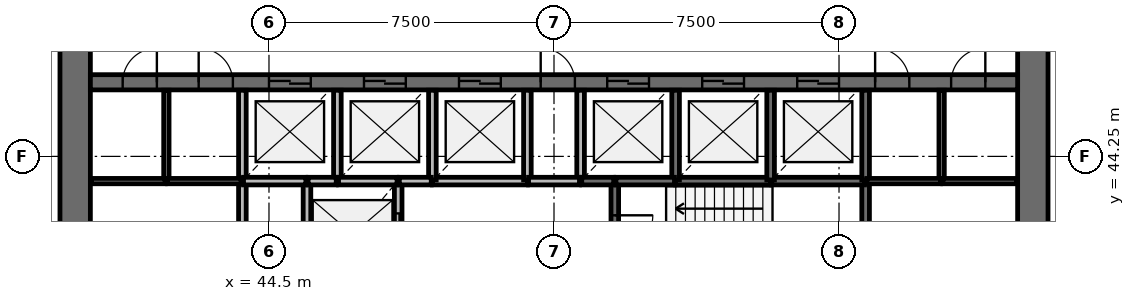
"""IFC4 building model, lengths in metres.
Left out: names, types, materials, properties, quantities, classifications, styles, units other than length and angle.
Written with IfcOpenShell. Run it as: python <this file> out.ifc"""

import sys

from ifc_helpers import new_model, si_unit, direction, frame, frame_2d, origin, place, context, subcontext, project, spatial, rectangle, extrude, source, transform, mapped, element, fill, save


model = new_model("IFC4")
c1 = context("Model", 3, precision=1e-05, world=origin(), true_north=direction((0.0, 1.0)))
c2 = subcontext(c1, "Body", "Model", "MODEL_VIEW")
j1 = project(units=[si_unit("LENGTHUNIT", "METRE"), si_unit("PLANEANGLEUNIT", "RADIAN")], contexts=[c1])
p1 = place(None, origin())
s1 = spatial("IfcSite", under=j1, at=p1, CompositionType="ELEMENT")
p2 = place(p1, origin())
s2 = spatial("IfcBuilding", under=s1, at=p2, CompositionType="ELEMENT")
p3 = place(p2, frame((0.0, 0.0, 133.1)))
s3 = spatial("IfcBuildingStorey", under=s2, at=p3, CompositionType="ELEMENT", Elevation=133.1)
p4 = place(p3, frame((64.6, 38.0, 0.0), z_axis=(0.0, 0.0, 1.0), x_axis=(0.0, 1.0, 0.0)))
e1 = element("IfcWall", 1, at=p4, inside=s3, PredefinedType="SHEAR", context=c2, shape_type="SweptSolid", body=[
    extrude(rectangle(XDim=20.0, YDim=0.8, at=frame_2d((10.0, 0.0))), origin(), (0.0, 0.0, 1.0), 3.9),
])
p5 = place(p4, frame((9.1, 0.0, 0.0)))
e2 = element("IfcOpeningElement", 2, at=p5, cuts=e1, PredefinedType="OPENING", context=c2, shape_type="SweptSolid", body=[
    extrude(rectangle(XDim=1.8, YDim=2.1, at=frame_2d((0.9, 1.05))), frame((0.0, 0.41, 0.0), z_axis=(0.0, -1.0, 0.0), x_axis=(1.0, 0.0, 0.0)), (0.0, 0.0, 1.0), 0.82),
])
p6 = place(p3, frame((39.4, 58.0, 0.0), z_axis=(0.0, 0.0, 1.0), x_axis=(0.0, -1.0, 0.0)))
e3 = element("IfcWall", 3, at=p6, inside=s3, PredefinedType="SHEAR", context=c2, shape_type="SweptSolid", body=[
    extrude(rectangle(XDim=20.0, YDim=0.8, at=frame_2d((10.0, 0.0))), origin(), (0.0, 0.0, 1.0), 3.9),
])
p7 = place(p6, frame((9.1, 0.0, 0.0)))
e4 = element("IfcOpeningElement", 4, at=p7, cuts=e3, PredefinedType="OPENING", context=c2, shape_type="SweptSolid", body=[
    extrude(rectangle(XDim=1.8, YDim=2.1, at=frame_2d((0.9, 1.05))), frame((0.0, 0.41, 0.0), z_axis=(0.0, -1.0, 0.0), x_axis=(1.0, 0.0, 0.0)), (0.0, 0.0, 1.0), 0.82),
])
p8 = place(p3, frame((39.8, 46.2, 0.0), z_axis=(0.0, 0.0, 1.0), x_axis=(1.0, 0.0, 0.0)))
e5 = element("IfcWall", 5, at=p8, inside=s3, PredefinedType="SHEAR", context=c2, shape_type="SweptSolid", body=[
    extrude(rectangle(XDim=24.4, YDim=0.4, at=frame_2d((12.2, 0.0))), origin(), (0.0, 0.0, 1.0), 3.9),
])
p9 = place(p8, frame((13.6, 0.0, 0.0)))
e6 = element("IfcOpeningElement", 6, at=p9, cuts=e5, PredefinedType="OPENING", context=c2, shape_type="SweptSolid", body=[
    extrude(rectangle(XDim=1.1, YDim=2.1, at=frame_2d((0.55, 1.05))), frame((0.0, 0.21, 0.0), z_axis=(0.0, -1.0, 0.0), x_axis=(1.0, 0.0, 0.0)), (0.0, 0.0, 1.0), 0.42),
])
p10 = place(p8, frame((16.1, 0.0, 0.0)))
e7 = element("IfcOpeningElement", 7, at=p10, cuts=e5, PredefinedType="OPENING", context=c2, shape_type="SweptSolid", body=[
    extrude(rectangle(XDim=1.1, YDim=2.1, at=frame_2d((0.55, 1.05))), frame((0.0, 0.21, 0.0), z_axis=(0.0, -1.0, 0.0), x_axis=(1.0, 0.0, 0.0)), (0.0, 0.0, 1.0), 0.42),
])
p11 = place(p8, frame((18.6, 0.0, 0.0)))
e8 = element("IfcOpeningElement", 8, at=p11, cuts=e5, PredefinedType="OPENING", context=c2, shape_type="SweptSolid", body=[
    extrude(rectangle(XDim=1.1, YDim=2.1, at=frame_2d((0.55, 1.05))), frame((0.0, 0.21, 0.0), z_axis=(0.0, -1.0, 0.0), x_axis=(1.0, 0.0, 0.0)), (0.0, 0.0, 1.0), 0.42),
])
p12 = place(p8, frame((4.7, 0.0, 0.0)))
e9 = element("IfcOpeningElement", 9, at=p12, cuts=e5, PredefinedType="OPENING", context=c2, shape_type="SweptSolid", body=[
    extrude(rectangle(XDim=1.1, YDim=2.1, at=frame_2d((0.55, 1.05))), frame((0.0, 0.21, 0.0), z_axis=(0.0, -1.0, 0.0), x_axis=(1.0, 0.0, 0.0)), (0.0, 0.0, 1.0), 0.42),
])
p13 = place(p8, frame((7.2, 0.0, 0.0)))
e10 = element("IfcOpeningElement", 10, at=p13, cuts=e5, PredefinedType="OPENING", context=c2, shape_type="SweptSolid", body=[
    extrude(rectangle(XDim=1.1, YDim=2.1, at=frame_2d((0.55, 1.05))), frame((0.0, 0.21, 0.0), z_axis=(0.0, -1.0, 0.0), x_axis=(1.0, 0.0, 0.0)), (0.0, 0.0, 1.0), 0.42),
])
p14 = place(p8, frame((9.7, 0.0, 0.0)))
e11 = element("IfcOpeningElement", 11, at=p14, cuts=e5, PredefinedType="OPENING", context=c2, shape_type="SweptSolid", body=[
    extrude(rectangle(XDim=1.1, YDim=2.1, at=frame_2d((0.55, 1.05))), frame((0.0, 0.21, 0.0), z_axis=(0.0, -1.0, 0.0), x_axis=(1.0, 0.0, 0.0)), (0.0, 0.0, 1.0), 0.42),
])
p15 = place(p8, frame((20.65, 0.0, 0.0)))
e12 = element("IfcOpeningElement", 12, at=p15, cuts=e5, PredefinedType="OPENING", context=c2, shape_type="SweptSolid", body=[
    extrude(rectangle(XDim=0.9, YDim=2.1, at=frame_2d((0.45, 1.05))), frame((0.0, 0.21, 0.0), z_axis=(0.0, -1.0, 0.0), x_axis=(1.0, 0.0, 0.0)), (0.0, 0.0, 1.0), 0.42),
])
p16 = place(p8, frame((22.65, 0.0, 0.0)))
e13 = element("IfcOpeningElement", 13, at=p16, cuts=e5, PredefinedType="OPENING", context=c2, shape_type="SweptSolid", body=[
    extrude(rectangle(XDim=0.9, YDim=2.1, at=frame_2d((0.45, 1.05))), frame((0.0, 0.21, 0.0), z_axis=(0.0, -1.0, 0.0), x_axis=(1.0, 0.0, 0.0)), (0.0, 0.0, 1.0), 0.42),
])
p17 = place(p8, frame((0.85, 0.0, 0.0)))
e14 = element("IfcOpeningElement", 14, at=p17, cuts=e5, PredefinedType="OPENING", context=c2, shape_type="SweptSolid", body=[
    extrude(rectangle(XDim=0.9, YDim=2.1, at=frame_2d((0.45, 1.05))), frame((0.0, 0.21, 0.0), z_axis=(0.0, -1.0, 0.0), x_axis=(1.0, 0.0, 0.0)), (0.0, 0.0, 1.0), 0.42),
])
p18 = place(p8, frame((2.85, 0.0, 0.0)))
e15 = element("IfcOpeningElement", 15, at=p18, cuts=e5, PredefinedType="OPENING", context=c2, shape_type="SweptSolid", body=[
    extrude(rectangle(XDim=0.9, YDim=2.1, at=frame_2d((0.45, 1.05))), frame((0.0, 0.21, 0.0), z_axis=(0.0, -1.0, 0.0), x_axis=(1.0, 0.0, 0.0)), (0.0, 0.0, 1.0), 0.42),
])
p19 = place(p8, frame((11.85, 0.0, 0.0)))
e16 = element("IfcOpeningElement", 16, at=p19, cuts=e5, PredefinedType="OPENING", context=c2, shape_type="SweptSolid", body=[
    extrude(rectangle(XDim=0.9, YDim=2.1, at=frame_2d((0.45, 1.05))), frame((0.0, 0.21, 0.0), z_axis=(0.0, -1.0, 0.0), x_axis=(1.0, 0.0, 0.0)), (0.0, 0.0, 1.0), 0.42),
])
for number, where, z_axis, x_axis in (
    (17, (43.8, 43.6, 0.0), (0.0, 0.0, 1.0), (0.0, -1.0, 0.0)),
    (18, (45.5, 43.6, 0.0), (0.0, 0.0, 1.0), (0.0, -1.0, 0.0)),
):
    element("IfcWall", number, at=place(p3, frame(where, z_axis=z_axis, x_axis=x_axis)), inside=s3, PredefinedType="SOLIDWALL", context=c2, shape_type="SweptSolid", body=[
        extrude(rectangle(XDim=2.8, YDim=0.2, at=frame_2d((1.4, 0.0))), origin(), (0.0, 0.0, 1.0), 3.58),
    ])
p20 = place(p3, frame((47.9, 40.83, 0.0), z_axis=(0.0, 0.0, 1.0), x_axis=(0.0, 1.0, 0.0)))
e19 = element("IfcWall", 19, at=p20, inside=s3, PredefinedType="SOLIDWALL", context=c2, shape_type="SweptSolid", body=[
    extrude(rectangle(XDim=2.77, YDim=0.2, at=frame_2d((1.385, 0.0))), origin(), (0.0, 0.0, 1.0), 3.58),
])
p21 = place(p20, frame((0.82, 0.0, 0.0)))
e20 = element("IfcOpeningElement", 20, at=p21, cuts=e19, PredefinedType="OPENING", context=c2, shape_type="SweptSolid", body=[
    extrude(rectangle(XDim=1.1, YDim=2.1, at=frame_2d((0.55, 1.05))), frame((0.0, 0.11, 0.0), z_axis=(0.0, -1.0, 0.0), x_axis=(1.0, 0.0, 0.0)), (0.0, 0.0, 1.0), 0.22),
])
p22 = place(p3, frame((60.2, 40.83, 0.0), z_axis=(0.0, 0.0, 1.0), x_axis=(0.0, 1.0, 0.0)))
e21 = element("IfcWall", 21, at=p22, inside=s3, PredefinedType="SOLIDWALL", context=c2, shape_type="SweptSolid", body=[
    extrude(rectangle(XDim=2.77, YDim=0.2, at=frame_2d((1.385, 0.0))), origin(), (0.0, 0.0, 1.0), 3.58),
])
p23 = place(p3, frame((53.6, 43.6, 0.0), z_axis=(0.0, 0.0, 1.0), x_axis=(0.0, -1.0, 0.0)))
e22 = element("IfcWall", 22, at=p23, inside=s3, PredefinedType="SOLIDWALL", context=c2, shape_type="SweptSolid", body=[
    extrude(rectangle(XDim=2.77, YDim=0.2, at=frame_2d((1.385, 0.0))), origin(), (0.0, 0.0, 1.0), 3.58),
])
p24 = place(p23, frame((0.9, 0.0, 0.0)))
e23 = element("IfcOpeningElement", 23, at=p24, cuts=e22, PredefinedType="OPENING", context=c2, shape_type="SweptSolid", body=[
    extrude(rectangle(XDim=1.0, YDim=2.1, at=frame_2d((0.5, 1.05))), frame((0.0, 0.11, 0.0), z_axis=(0.0, -1.0, 0.0), x_axis=(1.0, 0.0, 0.0)), (0.0, 0.0, 1.0), 0.22),
])
for number, where, z_axis, x_axis in (
    (24, (48.8, 43.6, 0.0), (0.0, 0.0, 1.0), (1.0, 0.0, 0.0)),
    (25, (55.2, 43.6, 0.0), (0.0, 0.0, 1.0), (1.0, 0.0, 0.0)),
):
    element("IfcWall", number, at=place(p3, frame(where, z_axis=z_axis, x_axis=x_axis)), inside=s3, PredefinedType="SOLIDWALL", context=c2, shape_type="SweptSolid", body=[
        extrude(rectangle(XDim=2.5, YDim=0.2, at=frame_2d((1.25, 0.0))), origin(), (0.0, 0.0, 1.0), 3.58),
    ])
p25 = place(p3, frame((57.73, 43.6, 0.0), z_axis=(0.0, 0.0, 1.0), x_axis=(1.0, 0.0, 0.0)))
e26 = element("IfcWall", 26, at=p25, inside=s3, PredefinedType="SOLIDWALL", context=c2, shape_type="SweptSolid", body=[
    extrude(rectangle(XDim=2.44, YDim=0.2, at=frame_2d((1.22, 0.0))), origin(), (0.0, 0.0, 1.0), 3.58),
])
p26 = place(p3, frame((43.8, 45.99, 0.0), z_axis=(0.0, 0.0, 1.0), x_axis=(0.0, -1.0, 0.0)))
e27 = element("IfcWall", 27, at=p26, inside=s3, PredefinedType="SOLIDWALL", context=c2, shape_type="SweptSolid", body=[
    extrude(rectangle(XDim=2.36, YDim=0.2, at=frame_2d((1.18, 0.0))), origin(), (0.0, 0.0, 1.0), 3.58),
])
p27 = place(p3, frame((46.3, 43.6, 0.0), z_axis=(0.0, 0.0, 1.0), x_axis=(0.0, 1.0, 0.0)))
e28 = element("IfcWall", 28, at=p27, inside=s3, PredefinedType="SOLIDWALL", context=c2, shape_type="SweptSolid", body=[
    extrude(rectangle(XDim=2.39, YDim=0.2, at=frame_2d((1.195, 0.0))), origin(), (0.0, 0.0, 1.0), 3.58),
])
for number, where, z_axis, x_axis in (
    (29, (48.8, 43.63, 0.0), (0.0, 0.0, 1.0), (0.0, 1.0, 0.0)),
    (30, (51.3, 43.63, 0.0), (0.0, 0.0, 1.0), (0.0, 1.0, 0.0)),
):
    element("IfcWall", number, at=place(p3, frame(where, z_axis=z_axis, x_axis=x_axis)), inside=s3, PredefinedType="SOLIDWALL", context=c2, shape_type="SweptSolid", body=[
        extrude(rectangle(XDim=2.36, YDim=0.2, at=frame_2d((1.18, 0.0))), origin(), (0.0, 0.0, 1.0), 3.58),
    ])
p28 = place(p3, frame((52.7, 45.99, 0.0), z_axis=(0.0, 0.0, 1.0), x_axis=(0.0, -1.0, 0.0)))
e31 = element("IfcWall", 31, at=p28, inside=s3, PredefinedType="SOLIDWALL", context=c2, shape_type="SweptSolid", body=[
    extrude(rectangle(XDim=2.39, YDim=0.2, at=frame_2d((1.195, 0.0))), origin(), (0.0, 0.0, 1.0), 3.58),
])
for number, where, z_axis, x_axis in (
    (32, (55.2, 43.63, 0.0), (0.0, 0.0, 1.0), (0.0, 1.0, 0.0)),
    (33, (57.7, 43.63, 0.0), (0.0, 0.0, 1.0), (0.0, 1.0, 0.0)),
    (34, (60.2, 43.63, 0.0), (0.0, 0.0, 1.0), (0.0, 1.0, 0.0)),
):
    element("IfcWall", number, at=place(p3, frame(where, z_axis=z_axis, x_axis=x_axis)), inside=s3, PredefinedType="SOLIDWALL", context=c2, shape_type="SweptSolid", body=[
        extrude(rectangle(XDim=2.36, YDim=0.2, at=frame_2d((1.18, 0.0))), origin(), (0.0, 0.0, 1.0), 3.58),
    ])
p29 = place(p3, frame((43.83, 43.6, 0.0), z_axis=(0.0, 0.0, 1.0), x_axis=(1.0, 0.0, 0.0)))
e35 = element("IfcWall", 35, at=p29, inside=s3, PredefinedType="SOLIDWALL", context=c2, shape_type="SweptSolid", body=[
    extrude(rectangle(XDim=1.64, YDim=0.2, at=frame_2d((0.82, 0.0))), origin(), (0.0, 0.0, 1.0), 3.58),
])
for number, where, z_axis, x_axis in (
    (36, (46.33, 43.6, 0.0), (0.0, 0.0, 1.0), (1.0, 0.0, 0.0)),
    (37, (53.63, 43.6, 0.0), (0.0, 0.0, 1.0), (1.0, 0.0, 0.0)),
):
    element("IfcWall", number, at=place(p3, frame(where, z_axis=z_axis, x_axis=x_axis)), inside=s3, PredefinedType="SOLIDWALL", context=c2, shape_type="SweptSolid", body=[
        extrude(rectangle(XDim=1.54, YDim=0.2, at=frame_2d((0.77, 0.0))), origin(), (0.0, 0.0, 1.0), 3.58),
    ])
p30 = place(p3, frame((52.67, 43.6, 0.0), z_axis=(0.0, 0.0, 1.0), x_axis=(-1.0, 0.0, 0.0)))
e38 = element("IfcWall", 38, at=p30, inside=s3, PredefinedType="SOLIDWALL", context=c2, shape_type="SweptSolid", body=[
    extrude(rectangle(XDim=1.34, YDim=0.2, at=frame_2d((0.67, 0.0))), origin(), (0.0, 0.0, 1.0), 3.58),
])
for number, where, z_axis, x_axis in (
    (39, (47.93, 43.6, 0.0), (0.0, 0.0, 1.0), (1.0, 0.0, 0.0)),
    (40, (52.73, 43.6, 0.0), (0.0, 0.0, 1.0), (1.0, 0.0, 0.0)),
):
    element("IfcWall", number, at=place(p3, frame(where, z_axis=z_axis, x_axis=x_axis)), inside=s3, PredefinedType="SOLIDWALL", context=c2, shape_type="SweptSolid", body=[
        extrude(rectangle(XDim=0.84, YDim=0.2, at=frame_2d((0.42, 0.0))), origin(), (0.0, 0.0, 1.0), 3.58),
    ])
p31 = place(p3, frame((45.53, 43.6, 0.0), z_axis=(0.0, 0.0, 1.0), x_axis=(1.0, 0.0, 0.0)))
e41 = element("IfcWall", 41, at=p31, inside=s3, PredefinedType="SOLIDWALL", context=c2, shape_type="SweptSolid", body=[
    extrude(rectangle(XDim=0.74, YDim=0.2, at=frame_2d((0.37, 0.0))), origin(), (0.0, 0.0, 1.0), 3.58),
])
for number, where, z_axis, x_axis in (
    (42, (41.8, 43.6, 0.0), (0.0, 0.0, 1.0), (0.0, 1.0, 0.0)),
    (43, (62.2, 43.6, 0.0), (0.0, 0.0, 1.0), (0.0, 1.0, 0.0)),
):
    element("IfcWall", number, at=place(p3, frame(where, z_axis=z_axis, x_axis=x_axis)), inside=s3, PredefinedType="PARTITIONING", context=c2, shape_type="SweptSolid", body=[
        extrude(rectangle(XDim=2.39, YDim=0.14, at=frame_2d((1.195, 0.0))), origin(), (0.0, 0.0, 1.0), 2.88),
    ])
for number, where, z_axis, x_axis in (
    (44, (43.77, 43.6, 0.0), (0.0, 0.0, 1.0), (-1.0, 0.0, 0.0)),
    (45, (60.23, 43.6, 0.0), (0.0, 0.0, 1.0), (1.0, 0.0, 0.0)),
):
    element("IfcWall", number, at=place(p3, frame(where, z_axis=z_axis, x_axis=x_axis)), inside=s3, PredefinedType="PARTITIONING", context=c2, shape_type="SweptSolid", body=[
        extrude(rectangle(XDim=1.94, YDim=0.14, at=frame_2d((0.97, 0.0))), origin(), (0.0, 0.0, 1.0), 2.88),
    ])
for number, where, z_axis, x_axis in (
    (46, (62.23, 43.6, 0.0), (0.0, 0.0, 1.0), (1.0, 0.0, 0.0)),
    (47, (41.77, 43.6, 0.0), (0.0, 0.0, 1.0), (-1.0, 0.0, 0.0)),
):
    element("IfcWall", number, at=place(p3, frame(where, z_axis=z_axis, x_axis=x_axis)), inside=s3, PredefinedType="PARTITIONING", context=c2, shape_type="SweptSolid", body=[
        extrude(rectangle(XDim=1.95, YDim=0.14, at=frame_2d((0.975, 0.0))), origin(), (0.0, 0.0, 1.0), 2.88),
    ])
m1 = source(origin(), c2, "Body", "SweptSolid", [
    extrude(rectangle(XDim=1.1, YDim=2.1, at=frame_2d((0.55, 1.05))), frame((0.0, 0.025, 0.0), z_axis=(0.0, -1.0, 0.0), x_axis=(1.0, 0.0, 0.0)), (0.0, 0.0, 1.0), 0.05),
])
p32 = place(p9, origin())
e48 = element("IfcDoor", 48, at=p32, inside=s3, OperationType="DOUBLE_DOOR_SLIDING", PredefinedType="USERDEFINED", context=c2, shape_type="MappedRepresentation", body=[
    mapped(m1, transform((0.0, 0.0, 0.0), scale=1.0)),
])
fill(e6, e48)
p33 = place(p10, origin())
e49 = element("IfcDoor", 49, at=p33, inside=s3, OperationType="DOUBLE_DOOR_SLIDING", PredefinedType="USERDEFINED", context=c2, shape_type="MappedRepresentation", body=[
    mapped(m1, transform((0.0, 0.0, 0.0), scale=1.0)),
])
fill(e7, e49)
p34 = place(p11, origin())
e50 = element("IfcDoor", 50, at=p34, inside=s3, OperationType="DOUBLE_DOOR_SLIDING", PredefinedType="USERDEFINED", context=c2, shape_type="MappedRepresentation", body=[
    mapped(m1, transform((0.0, 0.0, 0.0), scale=1.0)),
])
fill(e8, e50)
p35 = place(p12, origin())
e51 = element("IfcDoor", 51, at=p35, inside=s3, OperationType="DOUBLE_DOOR_SLIDING", PredefinedType="USERDEFINED", context=c2, shape_type="MappedRepresentation", body=[
    mapped(m1, transform((0.0, 0.0, 0.0), scale=1.0)),
])
fill(e9, e51)
p36 = place(p13, origin())
e52 = element("IfcDoor", 52, at=p36, inside=s3, OperationType="DOUBLE_DOOR_SLIDING", PredefinedType="USERDEFINED", context=c2, shape_type="MappedRepresentation", body=[
    mapped(m1, transform((0.0, 0.0, 0.0), scale=1.0)),
])
fill(e10, e52)
p37 = place(p14, origin())
e53 = element("IfcDoor", 53, at=p37, inside=s3, OperationType="DOUBLE_DOOR_SLIDING", PredefinedType="USERDEFINED", context=c2, shape_type="MappedRepresentation", body=[
    mapped(m1, transform((0.0, 0.0, 0.0), scale=1.0)),
])
fill(e11, e53)
p38 = place(p21, origin())
e54 = element("IfcDoor", 54, at=p38, inside=s3, OperationType="DOUBLE_DOOR_SLIDING", PredefinedType="USERDEFINED", context=c2, shape_type="MappedRepresentation", body=[
    mapped(m1, transform((0.0, 0.0, 0.0), scale=1.0)),
])
fill(e20, e54)
m2 = source(origin(), c2, "Body", "SweptSolid", [
    extrude(rectangle(XDim=1.0, YDim=2.1, at=frame_2d((0.5, 1.05))), frame((0.0, 0.025, 0.0), z_axis=(0.0, -1.0, 0.0), x_axis=(1.0, 0.0, 0.0)), (0.0, 0.0, 1.0), 0.05),
])
p39 = place(p24, origin())
e55 = element("IfcDoor", 55, at=p39, inside=s3, OperationType="SINGLE_SWING_LEFT", PredefinedType="DOOR", context=c2, shape_type="MappedRepresentation", body=[
    mapped(m2, transform((0.0, 0.0, 0.0), scale=1.0)),
])
fill(e23, e55)
m3 = source(origin(), c2, "Body", "SweptSolid", [
    extrude(rectangle(XDim=0.9, YDim=2.1, at=frame_2d((0.45, 1.05))), frame((0.0, 0.025, 0.0), z_axis=(0.0, -1.0, 0.0), x_axis=(1.0, 0.0, 0.0)), (0.0, 0.0, 1.0), 0.05),
])
p40 = place(p15, origin())
e56 = element("IfcDoor", 56, at=p40, inside=s3, OperationType="SINGLE_SWING_LEFT", PredefinedType="DOOR", context=c2, shape_type="MappedRepresentation", body=[
    mapped(m3, transform((0.0, 0.0, 0.0), scale=1.0)),
])
fill(e12, e56)
p41 = place(p16, origin())
e57 = element("IfcDoor", 57, at=p41, inside=s3, OperationType="SINGLE_SWING_RIGHT", PredefinedType="DOOR", context=c2, shape_type="MappedRepresentation", body=[
    mapped(m3, transform((0.0, 0.0, 0.0), scale=1.0)),
])
fill(e13, e57)
p42 = place(p17, origin())
e58 = element("IfcDoor", 58, at=p42, inside=s3, OperationType="SINGLE_SWING_RIGHT", PredefinedType="DOOR", context=c2, shape_type="MappedRepresentation", body=[
    mapped(m3, transform((0.0, 0.0, 0.0), scale=1.0)),
])
fill(e14, e58)
p43 = place(p18, origin())
e59 = element("IfcDoor", 59, at=p43, inside=s3, OperationType="SINGLE_SWING_LEFT", PredefinedType="DOOR", context=c2, shape_type="MappedRepresentation", body=[
    mapped(m3, transform((0.0, 0.0, 0.0), scale=1.0)),
])
fill(e15, e59)
p44 = place(p19, origin())
e60 = element("IfcDoor", 60, at=p44, inside=s3, OperationType="SINGLE_SWING_LEFT", PredefinedType="DOOR", context=c2, shape_type="MappedRepresentation", body=[
    mapped(m3, transform((0.0, 0.0, 0.0), scale=1.0)),
])
fill(e16, e60)
save(model, sys.argv[1])
